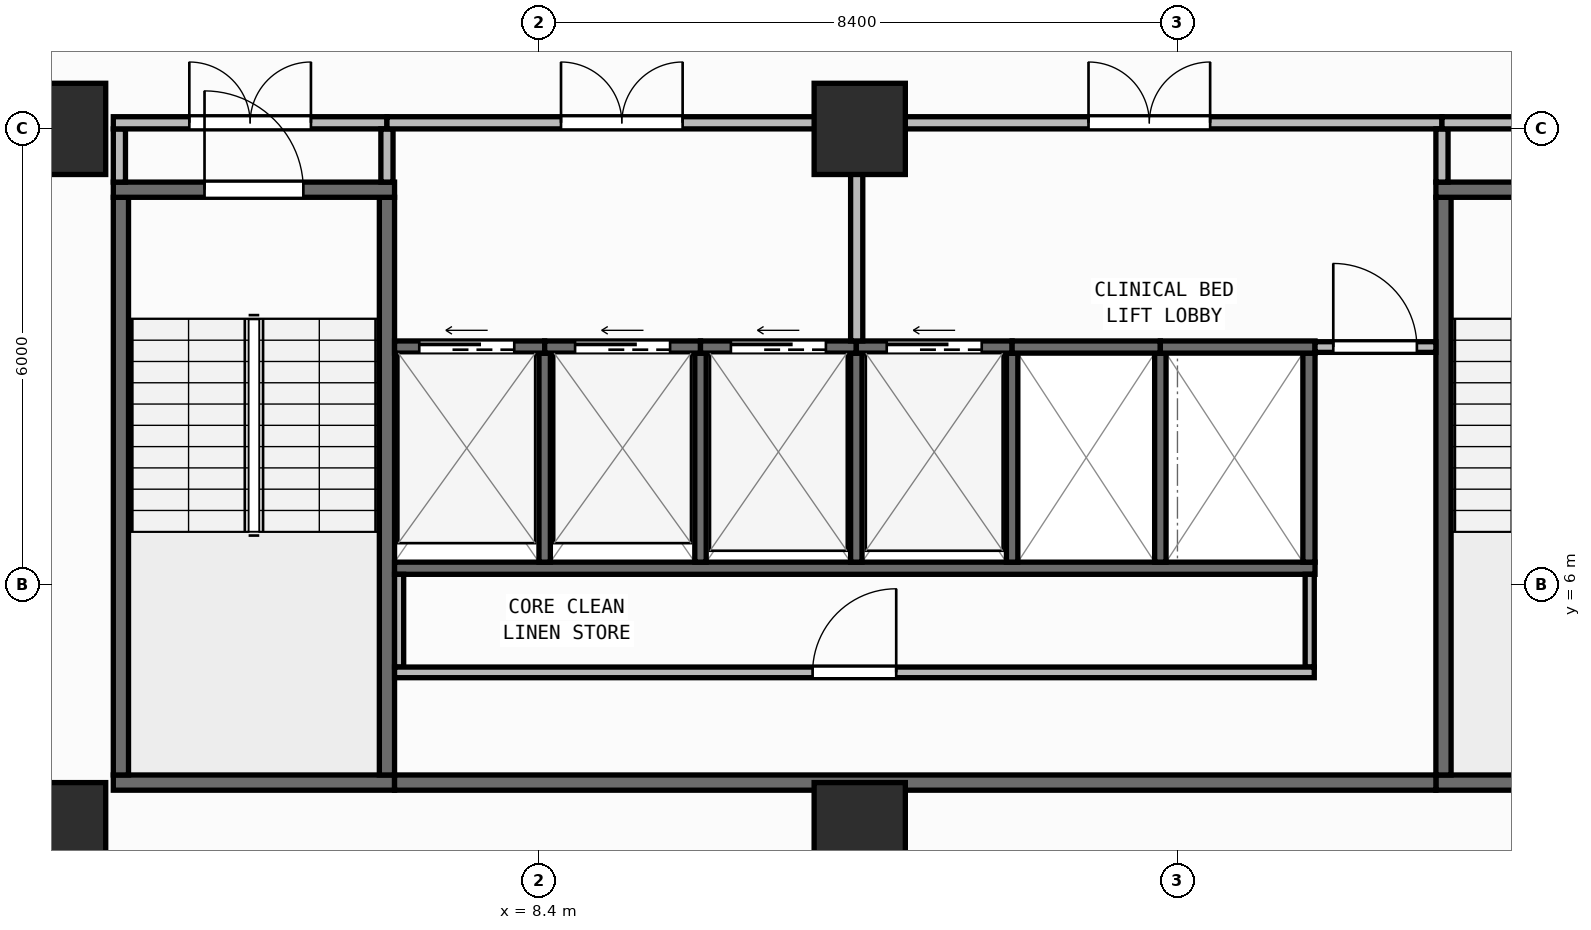
"""IFC4 building model, lengths in metres.
Left out: names, types, materials, properties, quantities, classifications, styles, units other than length and angle.
Written with IfcOpenShell. Run it as: python <this file> out.ifc"""

import sys

from ifc_helpers import new_model, si_unit, direction, frame, frame_2d, origin, origin_2d, place, context, subcontext, project, spatial, rectangle, extrude, element, fill, save


model = new_model("IFC4")
c1 = context("Model", 3, precision=1e-05, world=origin(), true_north=direction((0.0, 1.0)))
c2 = subcontext(c1, "Body", "Model", "MODEL_VIEW")
j1 = project(units=[si_unit("LENGTHUNIT", "METRE"), si_unit("PLANEANGLEUNIT", "RADIAN")], contexts=[c1])
p1 = place(None, origin())
s1 = spatial("IfcSite", under=j1, at=p1, CompositionType="ELEMENT")
p2 = place(p1, origin())
s2 = spatial("IfcBuilding", under=s1, at=p2, CompositionType="ELEMENT")
p3 = place(p2, frame((0.0, 0.0, 131.0)))
s3 = spatial("IfcBuildingStorey", under=s2, at=p3, CompositionType="ELEMENT", Elevation=131.0)
for number, where, z_axis, x_axis in (
    (1, (2.1, 2.8, 0.0), (0.0, 0.0, 1.0), (1.0, 0.0, 0.0)),
    (2, (12.62, 2.8, 0.0), (0.0, 0.0, 1.0), (1.0, 0.0, 0.0)),
    (3, (2.1, 12.0, 0.0), (0.0, 0.0, 1.0), (1.0, 0.0, 0.0)),
    (4, (12.62, 12.0, 0.0), (0.0, 0.0, 1.0), (1.0, 0.0, 0.0)),
):
    element("IfcColumn", number, at=place(p3, frame(where, z_axis=z_axis, x_axis=x_axis)), inside=s3, PredefinedType="COLUMN", context=c2, shape_type="SweptSolid", body=[
        extrude(rectangle(XDim=1.2, YDim=1.2, at=origin_2d()), origin(), (0.0, 0.0, 1.0), 3.95),
    ])
p4 = place(p3, frame((2.76, 0.173, 0.0), z_axis=(0.0, 0.0, 1.0), x_axis=(0.996857931723, 0.079210251617, 0.0)))
e5 = element("IfcWall", 5, at=p4, inside=s3, PredefinedType="STANDARD", context=c2, shape_type="SweptSolid", body=[
    extrude(rectangle(XDim=51.442, YDim=0.26, at=frame_2d((25.721, 0.0))), origin(), (0.0, 0.0, 1.0), 3.71),
])
p5 = place(p4, frame((24.521, 0.0, 0.9)))
e6 = element("IfcOpeningElement", 6, at=p5, cuts=e5, PredefinedType="OPENING", context=c2, shape_type="SweptSolid", body=[
    extrude(rectangle(XDim=2.4, YDim=1.65, at=frame_2d((1.2, 0.825))), frame((0.0, 0.14, 0.0), z_axis=(0.0, -1.0, 0.0), x_axis=(1.0, 0.0, 0.0)), (0.0, 0.0, 1.0), 0.28),
])
p6 = place(p3, frame((2.8, 3.4, 0.0), z_axis=(0.0, 0.0, 1.0), x_axis=(1.0, 0.0, 0.0)))
e7 = element("IfcWall", 7, at=p6, inside=s3, PredefinedType="SHEAR", context=c2, shape_type="SweptSolid", body=[
    extrude(rectangle(XDim=3.7, YDim=0.2, at=frame_2d((1.85, 0.0))), origin(), (0.0, 0.0, 1.0), 3.71),
])
for number, where, z_axis, x_axis in (
    (8, (2.9, 3.5, 0.0), (0.0, 0.0, 1.0), (0.0, 1.0, 0.0)),
    (9, (6.4, 3.5, 0.0), (0.0, 0.0, 1.0), (0.0, 1.0, 0.0)),
):
    element("IfcWall", number, at=place(p3, frame(where, z_axis=z_axis, x_axis=x_axis)), inside=s3, PredefinedType="SHEAR", context=c2, shape_type="SweptSolid", body=[
        extrude(rectangle(XDim=7.6, YDim=0.2, at=frame_2d((3.8, 0.0))), origin(), (0.0, 0.0, 1.0), 3.71),
    ])
p7 = place(p3, frame((2.8, 11.2, 0.0), z_axis=(0.0, 0.0, 1.0), x_axis=(1.0, 0.0, 0.0)))
e10 = element("IfcWall", 10, at=p7, inside=s3, PredefinedType="SHEAR", context=c2, shape_type="SweptSolid", body=[
    extrude(rectangle(XDim=3.7, YDim=0.2, at=frame_2d((1.85, 0.0))), origin(), (0.0, 0.0, 1.0), 3.71),
])
p8 = place(p7, frame((1.2, 0.0, 0.0)))
e11 = element("IfcOpeningElement", 11, at=p8, cuts=e10, PredefinedType="OPENING", context=c2, shape_type="SweptSolid", body=[
    extrude(rectangle(XDim=1.3, YDim=2.15, at=frame_2d((0.65, 1.075))), frame((0.0, 0.11, 0.0), z_axis=(0.0, -1.0, 0.0), x_axis=(1.0, 0.0, 0.0)), (0.0, 0.0, 1.0), 0.22),
])
p9 = place(p3, frame((20.2, 3.4, 0.0), z_axis=(0.0, 0.0, 1.0), x_axis=(1.0, 0.0, 0.0)))
e12 = element("IfcWall", 12, at=p9, inside=s3, PredefinedType="SHEAR", context=c2, shape_type="SweptSolid", body=[
    extrude(rectangle(XDim=3.7, YDim=0.2, at=frame_2d((1.85, 0.0))), origin(), (0.0, 0.0, 1.0), 3.71),
])
p10 = place(p3, frame((20.3, 3.5, 0.0), z_axis=(0.0, 0.0, 1.0), x_axis=(0.0, 1.0, 0.0)))
e13 = element("IfcWall", 13, at=p10, inside=s3, PredefinedType="SHEAR", context=c2, shape_type="SweptSolid", body=[
    extrude(rectangle(XDim=7.6, YDim=0.2, at=frame_2d((3.8, 0.0))), origin(), (0.0, 0.0, 1.0), 3.71),
])
p11 = place(p3, frame((20.2, 11.2, 0.0), z_axis=(0.0, 0.0, 1.0), x_axis=(1.0, 0.0, 0.0)))
e14 = element("IfcWall", 14, at=p11, inside=s3, PredefinedType="SHEAR", context=c2, shape_type="SweptSolid", body=[
    extrude(rectangle(XDim=3.7, YDim=0.2, at=frame_2d((1.85, 0.0))), origin(), (0.0, 0.0, 1.0), 3.71),
])
p12 = place(p11, frame((1.2, 0.0, 0.0)))
e15 = element("IfcOpeningElement", 15, at=p12, cuts=e14, PredefinedType="OPENING", context=c2, shape_type="SweptSolid", body=[
    extrude(rectangle(XDim=1.3, YDim=2.15, at=frame_2d((0.65, 1.075))), frame((0.0, 0.11, 0.0), z_axis=(0.0, -1.0, 0.0), x_axis=(1.0, 0.0, 0.0)), (0.0, 0.0, 1.0), 0.22),
])
p13 = place(p3, frame((6.5, 3.4, 0.0), z_axis=(0.0, 0.0, 1.0), x_axis=(1.0, 0.0, 0.0)))
e16 = element("IfcWall", 16, at=p13, inside=s3, PredefinedType="SHEAR", context=c2, shape_type="SweptSolid", body=[
    extrude(rectangle(XDim=13.7, YDim=0.2, at=frame_2d((6.85, 0.0))), origin(), (0.0, 0.0, 1.0), 3.71),
])
p14 = place(p3, frame((6.5, 6.22, 0.0), z_axis=(0.0, 0.0, 1.0), x_axis=(1.0, 0.0, 0.0)))
e17 = element("IfcWall", 17, at=p14, inside=s3, PredefinedType="SHEAR", context=c2, shape_type="SweptSolid", body=[
    extrude(rectangle(XDim=12.11, YDim=0.16, at=frame_2d((6.055, 0.0))), origin(), (0.0, 0.0, 1.0), 3.71),
])
p15 = place(p3, frame((18.53, 6.3, 0.0), z_axis=(0.0, 0.0, 1.0), x_axis=(0.0, 1.0, 0.0)))
e18 = element("IfcWall", 18, at=p15, inside=s3, PredefinedType="SHEAR", context=c2, shape_type="SweptSolid", body=[
    extrude(rectangle(XDim=2.75, YDim=0.16, at=frame_2d((1.375, 0.0))), origin(), (0.0, 0.0, 1.0), 3.71),
])
for number, where, z_axis, x_axis in (
    (19, (8.475, 6.3, 0.0), (0.0, 0.0, 1.0), (0.0, 1.0, 0.0)),
    (20, (10.525, 6.3, 0.0), (0.0, 0.0, 1.0), (0.0, 1.0, 0.0)),
    (21, (12.575, 6.3, 0.0), (0.0, 0.0, 1.0), (0.0, 1.0, 0.0)),
    (22, (14.625, 6.3, 0.0), (0.0, 0.0, 1.0), (0.0, 1.0, 0.0)),
    (23, (16.575, 6.3, 0.0), (0.0, 0.0, 1.0), (0.0, 1.0, 0.0)),
):
    element("IfcWall", number, at=place(p3, frame(where, z_axis=z_axis, x_axis=x_axis)), inside=s3, PredefinedType="SHEAR", context=c2, shape_type="SweptSolid", body=[
        extrude(rectangle(XDim=2.75, YDim=0.15, at=frame_2d((1.375, 0.0))), origin(), (0.0, 0.0, 1.0), 3.71),
    ])
p16 = place(p3, frame((6.5, 9.13, 0.0), z_axis=(0.0, 0.0, 1.0), x_axis=(1.0, 0.0, 0.0)))
e24 = element("IfcWall", 24, at=p16, inside=s3, PredefinedType="SHEAR", context=c2, shape_type="SweptSolid", body=[
    extrude(rectangle(XDim=1.975, YDim=0.16, at=frame_2d((0.988, 0.0))), origin(), (0.0, 0.0, 1.0), 3.71),
])
p17 = place(p16, frame((0.325, 0.0, 0.0)))
e25 = element("IfcOpeningElement", 25, at=p17, cuts=e24, PredefinedType="OPENING", context=c2, shape_type="SweptSolid", body=[
    extrude(rectangle(XDim=1.25, YDim=2.15, at=frame_2d((0.625, 1.075))), frame((0.0, 0.09, 0.0), z_axis=(0.0, -1.0, 0.0), x_axis=(1.0, 0.0, 0.0)), (0.0, 0.0, 1.0), 0.18),
])
p18 = place(p3, frame((8.475, 9.13, 0.0), z_axis=(0.0, 0.0, 1.0), x_axis=(1.0, 0.0, 0.0)))
e26 = element("IfcWall", 26, at=p18, inside=s3, PredefinedType="SHEAR", context=c2, shape_type="SweptSolid", body=[
    extrude(rectangle(XDim=2.05, YDim=0.16, at=frame_2d((1.025, 0.0))), origin(), (0.0, 0.0, 1.0), 3.71),
])
p19 = place(p18, frame((0.4, 0.0, 0.0)))
e27 = element("IfcOpeningElement", 27, at=p19, cuts=e26, PredefinedType="OPENING", context=c2, shape_type="SweptSolid", body=[
    extrude(rectangle(XDim=1.25, YDim=2.15, at=frame_2d((0.625, 1.075))), frame((0.0, 0.09, 0.0), z_axis=(0.0, -1.0, 0.0), x_axis=(1.0, 0.0, 0.0)), (0.0, 0.0, 1.0), 0.18),
])
p20 = place(p3, frame((10.525, 9.13, 0.0), z_axis=(0.0, 0.0, 1.0), x_axis=(1.0, 0.0, 0.0)))
e28 = element("IfcWall", 28, at=p20, inside=s3, PredefinedType="SHEAR", context=c2, shape_type="SweptSolid", body=[
    extrude(rectangle(XDim=2.05, YDim=0.16, at=frame_2d((1.025, 0.0))), origin(), (0.0, 0.0, 1.0), 3.71),
])
p21 = place(p20, frame((0.4, 0.0, 0.0)))
e29 = element("IfcOpeningElement", 29, at=p21, cuts=e28, PredefinedType="OPENING", context=c2, shape_type="SweptSolid", body=[
    extrude(rectangle(XDim=1.25, YDim=2.15, at=frame_2d((0.625, 1.075))), frame((0.0, 0.09, 0.0), z_axis=(0.0, -1.0, 0.0), x_axis=(1.0, 0.0, 0.0)), (0.0, 0.0, 1.0), 0.18),
])
p22 = place(p3, frame((12.575, 9.13, 0.0), z_axis=(0.0, 0.0, 1.0), x_axis=(1.0, 0.0, 0.0)))
e30 = element("IfcWall", 30, at=p22, inside=s3, PredefinedType="SHEAR", context=c2, shape_type="SweptSolid", body=[
    extrude(rectangle(XDim=2.05, YDim=0.16, at=frame_2d((1.025, 0.0))), origin(), (0.0, 0.0, 1.0), 3.71),
])
p23 = place(p22, frame((0.4, 0.0, 0.0)))
e31 = element("IfcOpeningElement", 31, at=p23, cuts=e30, PredefinedType="OPENING", context=c2, shape_type="SweptSolid", body=[
    extrude(rectangle(XDim=1.25, YDim=2.15, at=frame_2d((0.625, 1.075))), frame((0.0, 0.09, 0.0), z_axis=(0.0, -1.0, 0.0), x_axis=(1.0, 0.0, 0.0)), (0.0, 0.0, 1.0), 0.18),
])
p24 = place(p3, frame((14.625, 9.13, 0.0), z_axis=(0.0, 0.0, 1.0), x_axis=(1.0, 0.0, 0.0)))
e32 = element("IfcWall", 32, at=p24, inside=s3, PredefinedType="SHEAR", context=c2, shape_type="SweptSolid", body=[
    extrude(rectangle(XDim=1.95, YDim=0.16, at=frame_2d((0.975, 0.0))), origin(), (0.0, 0.0, 1.0), 3.71),
])
p25 = place(p3, frame((16.575, 9.13, 0.0), z_axis=(0.0, 0.0, 1.0), x_axis=(1.0, 0.0, 0.0)))
e33 = element("IfcWall", 33, at=p25, inside=s3, PredefinedType="SHEAR", context=c2, shape_type="SweptSolid", body=[
    extrude(rectangle(XDim=2.035, YDim=0.16, at=frame_2d((1.018, 0.0))), origin(), (0.0, 0.0, 1.0), 3.71),
])
for number, where, z_axis, x_axis in (
    (34, (6.56, 4.92, 0.0), (0.0, 0.0, 1.0), (0.0, 1.0, 0.0)),
    (35, (18.54, 4.92, 0.0), (0.0, 0.0, 1.0), (0.0, 1.0, 0.0)),
):
    element("IfcWall", number, at=place(p3, frame(where, z_axis=z_axis, x_axis=x_axis)), inside=s3, PredefinedType="PARTITIONING", context=c2, shape_type="SweptSolid", body=[
        extrude(rectangle(XDim=1.22, YDim=0.12, at=frame_2d((0.61, 0.0))), origin(), (0.0, 0.0, 1.0), 3.71),
    ])
p26 = place(p3, frame((6.5, 4.85, 0.0), z_axis=(0.0, 0.0, 1.0), x_axis=(1.0, 0.0, 0.0)))
e36 = element("IfcWall", 36, at=p26, inside=s3, PredefinedType="PARTITIONING", context=c2, shape_type="SweptSolid", body=[
    extrude(rectangle(XDim=12.1, YDim=0.14, at=frame_2d((6.05, 0.0))), origin(), (0.0, 0.0, 1.0), 3.71),
])
p27 = place(p26, frame((5.5, 0.0, 0.0)))
e37 = element("IfcOpeningElement", 37, at=p27, cuts=e36, PredefinedType="OPENING", context=c2, shape_type="SweptSolid", body=[
    extrude(rectangle(XDim=1.1, YDim=2.1, at=frame_2d((0.55, 1.05))), frame((0.0, 0.08, 0.0), z_axis=(0.0, -1.0, 0.0), x_axis=(1.0, 0.0, 0.0)), (0.0, 0.0, 1.0), 0.16),
])
p28 = place(p3, frame((18.61, 9.13, 0.0), z_axis=(0.0, 0.0, 1.0), x_axis=(1.0, 0.0, 0.0)))
e38 = element("IfcWall", 38, at=p28, inside=s3, PredefinedType="PARTITIONING", context=c2, shape_type="SweptSolid", body=[
    extrude(rectangle(XDim=1.59, YDim=0.14, at=frame_2d((0.795, 0.0))), origin(), (0.0, 0.0, 1.0), 3.71),
])
p29 = place(p28, frame((0.24, 0.0, 0.0)))
e39 = element("IfcOpeningElement", 39, at=p29, cuts=e38, PredefinedType="OPENING", context=c2, shape_type="SweptSolid", body=[
    extrude(rectangle(XDim=1.1, YDim=2.1, at=frame_2d((0.55, 1.05))), frame((0.0, 0.08, 0.0), z_axis=(0.0, -1.0, 0.0), x_axis=(1.0, 0.0, 0.0)), (0.0, 0.0, 1.0), 0.16),
])
p30 = place(p3, frame((2.88, 11.3, 0.0), z_axis=(0.0, 0.0, 1.0), x_axis=(0.0, 1.0, 0.0)))
e40 = element("IfcWall", 40, at=p30, inside=s3, PredefinedType="PARTITIONING", context=c2, shape_type="SweptSolid", body=[
    extrude(rectangle(XDim=0.7, YDim=0.16, at=frame_2d((0.35, 0.0))), origin(), (0.0, 0.0, 1.0), 3.71),
])
p31 = place(p3, frame((2.8, 12.08, 0.0), z_axis=(0.0, 0.0, 1.0), x_axis=(1.0, 0.0, 0.0)))
e41 = element("IfcWall", 41, at=p31, inside=s3, PredefinedType="PARTITIONING", context=c2, shape_type="SweptSolid", body=[
    extrude(rectangle(XDim=3.6, YDim=0.16, at=frame_2d((1.8, 0.0))), origin(), (0.0, 0.0, 1.0), 3.083),
])
p32 = place(p31, frame((1.0, 0.0, 0.0)))
e42 = element("IfcOpeningElement", 42, at=p32, cuts=e41, PredefinedType="OPENING", context=c2, shape_type="SweptSolid", body=[
    extrude(rectangle(XDim=1.6, YDim=2.05, at=frame_2d((0.8, 1.025))), frame((0.0, 0.09, 0.0), z_axis=(0.0, -1.0, 0.0), x_axis=(1.0, 0.0, 0.0)), (0.0, 0.0, 1.0), 0.18),
])
p33 = place(p3, frame((6.4, 11.3, 0.0), z_axis=(0.0, 0.0, 1.0), x_axis=(0.0, 1.0, 0.0)))
e43 = element("IfcWall", 43, at=p33, inside=s3, PredefinedType="PARTITIONING", context=c2, shape_type="SweptSolid", body=[
    extrude(rectangle(XDim=0.7, YDim=0.16, at=frame_2d((0.35, 0.0))), origin(), (0.0, 0.0, 1.0), 3.71),
])
p34 = place(p3, frame((6.4, 12.08, 0.0), z_axis=(0.0, 0.0, 1.0), x_axis=(1.0, 0.0, 0.0)))
e44 = element("IfcWall", 44, at=p34, inside=s3, PredefinedType="PARTITIONING", context=c2, shape_type="SweptSolid", body=[
    extrude(rectangle(XDim=6.18, YDim=0.16, at=frame_2d((3.09, 0.0))), origin(), (0.0, 0.0, 1.0), 3.083),
])
p35 = place(p34, frame((2.29, 0.0, 0.0)))
e45 = element("IfcOpeningElement", 45, at=p35, cuts=e44, PredefinedType="OPENING", context=c2, shape_type="SweptSolid", body=[
    extrude(rectangle(XDim=1.6, YDim=2.05, at=frame_2d((0.8, 1.025))), frame((0.0, 0.09, 0.0), z_axis=(0.0, -1.0, 0.0), x_axis=(1.0, 0.0, 0.0)), (0.0, 0.0, 1.0), 0.18),
])
p36 = place(p3, frame((12.58, 9.21, 0.0), z_axis=(0.0, 0.0, 1.0), x_axis=(0.0, 1.0, 0.0)))
e46 = element("IfcWall", 46, at=p36, inside=s3, PredefinedType="PARTITIONING", context=c2, shape_type="SweptSolid", body=[
    extrude(rectangle(XDim=2.79, YDim=0.16, at=frame_2d((1.395, 0.0))), origin(), (0.0, 0.0, 1.0), 3.71),
])
p37 = place(p3, frame((12.58, 12.08, 0.0), z_axis=(0.0, 0.0, 1.0), x_axis=(1.0, 0.0, 0.0)))
e47 = element("IfcWall", 47, at=p37, inside=s3, PredefinedType="PARTITIONING", context=c2, shape_type="SweptSolid", body=[
    extrude(rectangle(XDim=7.7, YDim=0.16, at=frame_2d((3.85, 0.0))), origin(), (0.0, 0.0, 1.0), 3.083),
])
p38 = place(p37, frame((3.05, 0.0, 0.0)))
e48 = element("IfcOpeningElement", 48, at=p38, cuts=e47, PredefinedType="OPENING", context=c2, shape_type="SweptSolid", body=[
    extrude(rectangle(XDim=1.6, YDim=2.05, at=frame_2d((0.8, 1.025))), frame((0.0, 0.09, 0.0), z_axis=(0.0, -1.0, 0.0), x_axis=(1.0, 0.0, 0.0)), (0.0, 0.0, 1.0), 0.18),
])
p39 = place(p3, frame((20.28, 11.3, 0.0), z_axis=(0.0, 0.0, 1.0), x_axis=(0.0, 1.0, 0.0)))
e49 = element("IfcWall", 49, at=p39, inside=s3, PredefinedType="PARTITIONING", context=c2, shape_type="SweptSolid", body=[
    extrude(rectangle(XDim=0.7, YDim=0.16, at=frame_2d((0.35, 0.0))), origin(), (0.0, 0.0, 1.0), 3.71),
])
p40 = place(p3, frame((20.28, 12.08, 0.0), z_axis=(0.0, 0.0, 1.0), x_axis=(1.0, 0.0, 0.0)))
e50 = element("IfcWall", 50, at=p40, inside=s3, PredefinedType="PARTITIONING", context=c2, shape_type="SweptSolid", body=[
    extrude(rectangle(XDim=3.62, YDim=0.16, at=frame_2d((1.81, 0.0))), origin(), (0.0, 0.0, 1.0), 3.083),
])
p41 = place(p40, frame((1.01, 0.0, 0.0)))
e51 = element("IfcOpeningElement", 51, at=p41, cuts=e50, PredefinedType="OPENING", context=c2, shape_type="SweptSolid", body=[
    extrude(rectangle(XDim=1.6, YDim=2.05, at=frame_2d((0.8, 1.025))), frame((0.0, 0.09, 0.0), z_axis=(0.0, -1.0, 0.0), x_axis=(1.0, 0.0, 0.0)), (0.0, 0.0, 1.0), 0.18),
])
p42 = place(p8, origin())
e52 = element("IfcDoor", 52, at=p42, inside=s3, OperationType="SINGLE_SWING_LEFT", PredefinedType="DOOR", context=c2, shape_type="SweptSolid", body=[
    extrude(rectangle(XDim=1.3, YDim=2.15, at=frame_2d((0.65, 1.075))), frame((0.0, 0.025, 0.0), z_axis=(0.0, -1.0, 0.0), x_axis=(1.0, 0.0, 0.0)), (0.0, 0.0, 1.0), 0.05),
])
fill(e11, e52)
p43 = place(p17, origin())
e53 = element("IfcDoor", 53, at=p43, inside=s3, OperationType="SLIDING_TO_LEFT", PredefinedType="DOOR", context=c2, shape_type="SweptSolid", body=[
    extrude(rectangle(XDim=1.25, YDim=2.15, at=frame_2d((0.625, 1.075))), frame((0.0, 0.025, 0.0), z_axis=(0.0, -1.0, 0.0), x_axis=(1.0, 0.0, 0.0)), (0.0, 0.0, 1.0), 0.05),
])
fill(e25, e53)
p44 = place(p19, origin())
e54 = element("IfcDoor", 54, at=p44, inside=s3, OperationType="SLIDING_TO_LEFT", PredefinedType="DOOR", context=c2, shape_type="SweptSolid", body=[
    extrude(rectangle(XDim=1.25, YDim=2.15, at=frame_2d((0.625, 1.075))), frame((0.0, 0.025, 0.0), z_axis=(0.0, -1.0, 0.0), x_axis=(1.0, 0.0, 0.0)), (0.0, 0.0, 1.0), 0.05),
])
fill(e27, e54)
p45 = place(p21, origin())
e55 = element("IfcDoor", 55, at=p45, inside=s3, OperationType="SLIDING_TO_LEFT", PredefinedType="DOOR", context=c2, shape_type="SweptSolid", body=[
    extrude(rectangle(XDim=1.25, YDim=2.15, at=frame_2d((0.625, 1.075))), frame((0.0, 0.025, 0.0), z_axis=(0.0, -1.0, 0.0), x_axis=(1.0, 0.0, 0.0)), (0.0, 0.0, 1.0), 0.05),
])
fill(e29, e55)
p46 = place(p23, origin())
e56 = element("IfcDoor", 56, at=p46, inside=s3, OperationType="SLIDING_TO_LEFT", PredefinedType="DOOR", context=c2, shape_type="SweptSolid", body=[
    extrude(rectangle(XDim=1.25, YDim=2.15, at=frame_2d((0.625, 1.075))), frame((0.0, 0.025, 0.0), z_axis=(0.0, -1.0, 0.0), x_axis=(1.0, 0.0, 0.0)), (0.0, 0.0, 1.0), 0.05),
])
fill(e31, e56)
p47 = place(p27, origin())
e57 = element("IfcDoor", 57, at=p47, inside=s3, OperationType="SINGLE_SWING_RIGHT", PredefinedType="DOOR", context=c2, shape_type="SweptSolid", body=[
    extrude(rectangle(XDim=1.1, YDim=2.1, at=frame_2d((0.55, 1.05))), frame((0.0, 0.025, 0.0), z_axis=(0.0, -1.0, 0.0), x_axis=(1.0, 0.0, 0.0)), (0.0, 0.0, 1.0), 0.05),
])
fill(e37, e57)
p48 = place(p29, origin())
e58 = element("IfcDoor", 58, at=p48, inside=s3, OperationType="SINGLE_SWING_LEFT", PredefinedType="DOOR", context=c2, shape_type="SweptSolid", body=[
    extrude(rectangle(XDim=1.1, YDim=2.1, at=frame_2d((0.55, 1.05))), frame((0.0, 0.025, 0.0), z_axis=(0.0, -1.0, 0.0), x_axis=(1.0, 0.0, 0.0)), (0.0, 0.0, 1.0), 0.05),
])
fill(e39, e58)
p49 = place(p32, origin())
e59 = element("IfcDoor", 59, at=p49, inside=s3, OperationType="DOUBLE_DOOR_SINGLE_SWING", PredefinedType="DOOR", context=c2, shape_type="SweptSolid", body=[
    extrude(rectangle(XDim=1.6, YDim=2.05, at=frame_2d((0.8, 1.025))), frame((0.0, 0.025, 0.0), z_axis=(0.0, -1.0, 0.0), x_axis=(1.0, 0.0, 0.0)), (0.0, 0.0, 1.0), 0.05),
])
fill(e42, e59)
p50 = place(p35, origin())
e60 = element("IfcDoor", 60, at=p50, inside=s3, OperationType="DOUBLE_DOOR_SINGLE_SWING", PredefinedType="DOOR", context=c2, shape_type="SweptSolid", body=[
    extrude(rectangle(XDim=1.6, YDim=2.05, at=frame_2d((0.8, 1.025))), frame((0.0, 0.025, 0.0), z_axis=(0.0, -1.0, 0.0), x_axis=(1.0, 0.0, 0.0)), (0.0, 0.0, 1.0), 0.05),
])
fill(e45, e60)
p51 = place(p38, origin())
e61 = element("IfcDoor", 61, at=p51, inside=s3, OperationType="DOUBLE_DOOR_SINGLE_SWING", PredefinedType="DOOR", context=c2, shape_type="SweptSolid", body=[
    extrude(rectangle(XDim=1.6, YDim=2.05, at=frame_2d((0.8, 1.025))), frame((0.0, 0.025, 0.0), z_axis=(0.0, -1.0, 0.0), x_axis=(1.0, 0.0, 0.0)), (0.0, 0.0, 1.0), 0.05),
])
fill(e48, e61)
save(model, sys.argv[1])
